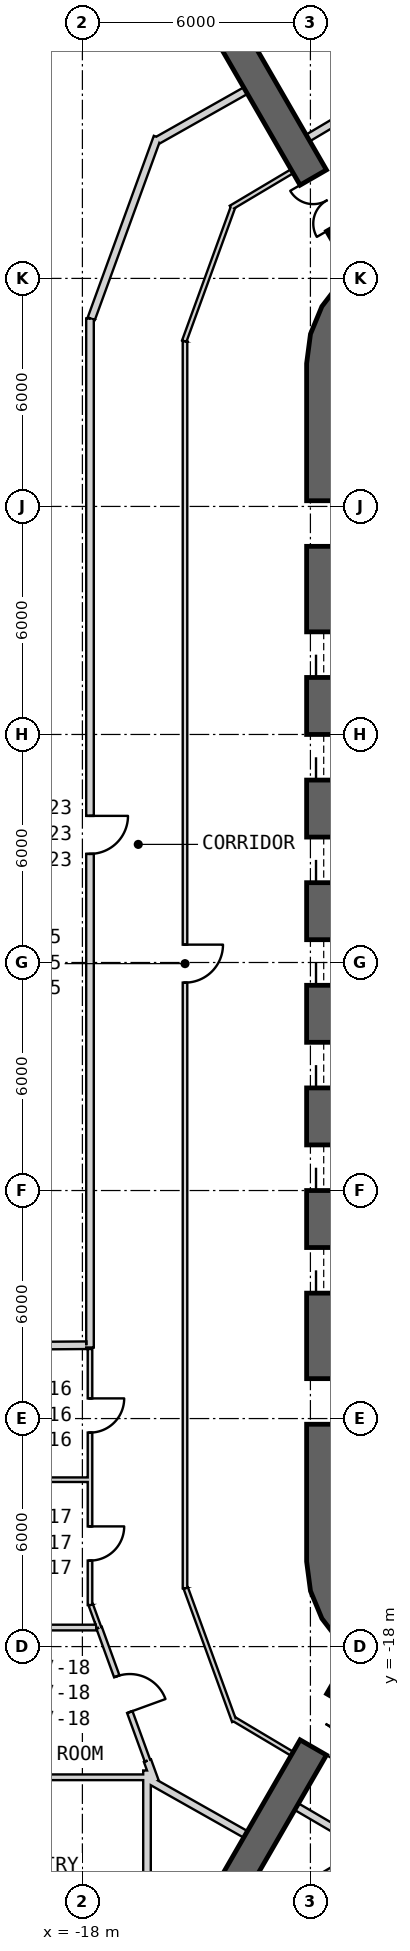
"""IFC4 building model, lengths in metres.
Left out: names, types, materials, properties, quantities, classifications, styles, units other than length and angle.
Written with IfcOpenShell. Run it as: python <this file> out.ifc"""

import sys

from ifc_helpers import new_model, si_unit, direction, frame, frame_2d, origin, place, context, subcontext, project, spatial, polyline, rectangle, outline, extrude, element, fill, save


model = new_model("IFC4")
c1 = context("Model", 3, precision=1e-05, world=origin(), true_north=direction((0.0, 1.0)))
c2 = subcontext(c1, "Body", "Model", "MODEL_VIEW")
j1 = project(units=[si_unit("LENGTHUNIT", "METRE"), si_unit("PLANEANGLEUNIT", "RADIAN")], contexts=[c1])
p1 = place(None, origin())
s1 = spatial("IfcSite", under=j1, at=p1, CompositionType="ELEMENT")
p2 = place(p1, origin())
s2 = spatial("IfcBuilding", under=s1, at=p2, CompositionType="ELEMENT")
p3 = place(p2, frame((0.0, 0.0, 131.6)))
s3 = spatial("IfcBuildingStorey", under=s2, at=p3, CompositionType="ELEMENT", Elevation=131.6)
p4 = place(p3, frame((-11.65, 15.762, 0.0), z_axis=(0.0, 0.0, 1.0), x_axis=(0.0, -1.0, 0.0)))
e1 = element("IfcWall", 1, at=p4, inside=s3, PredefinedType="SHEAR", context=c2, shape_type="SweptSolid", body=[
    extrude(rectangle(XDim=31.523, YDim=0.9, at=frame_2d((15.762, 0.0))), origin(), (0.0, 0.0, 1.0), 4.1),
])
p5 = place(p4, frame((7.062, 0.0, 0.0)))
e2 = element("IfcOpeningElement", 2, at=p5, cuts=e1, PredefinedType="OPENING", context=c2, shape_type="SweptSolid", body=[
    extrude(rectangle(XDim=1.2, YDim=2.4, at=frame_2d((0.6, 1.2))), frame((0.0, 0.46, 0.0), z_axis=(0.0, -1.0, 0.0), x_axis=(1.0, 0.0, 0.0)), (0.0, 0.0, 1.0), 0.92),
])
p6 = place(p4, frame((9.762, 0.0, 0.0)))
e3 = element("IfcOpeningElement", 3, at=p6, cuts=e1, PredefinedType="OPENING", context=c2, shape_type="SweptSolid", body=[
    extrude(rectangle(XDim=1.2, YDim=2.4, at=frame_2d((0.6, 1.2))), frame((0.0, 0.46, 0.0), z_axis=(0.0, -1.0, 0.0), x_axis=(1.0, 0.0, 0.0)), (0.0, 0.0, 1.0), 0.92),
])
p7 = place(p4, frame((12.462, 0.0, 0.0)))
e4 = element("IfcOpeningElement", 4, at=p7, cuts=e1, PredefinedType="OPENING", context=c2, shape_type="SweptSolid", body=[
    extrude(rectangle(XDim=1.2, YDim=2.4, at=frame_2d((0.6, 1.2))), frame((0.0, 0.46, 0.0), z_axis=(0.0, -1.0, 0.0), x_axis=(1.0, 0.0, 0.0)), (0.0, 0.0, 1.0), 0.92),
])
p8 = place(p4, frame((15.162, 0.0, 0.0)))
e5 = element("IfcOpeningElement", 5, at=p8, cuts=e1, PredefinedType="OPENING", context=c2, shape_type="SweptSolid", body=[
    extrude(rectangle(XDim=1.2, YDim=2.4, at=frame_2d((0.6, 1.2))), frame((0.0, 0.46, 0.0), z_axis=(0.0, -1.0, 0.0), x_axis=(1.0, 0.0, 0.0)), (0.0, 0.0, 1.0), 0.92),
])
p9 = place(p4, frame((17.862, 0.0, 0.0)))
e6 = element("IfcOpeningElement", 6, at=p9, cuts=e1, PredefinedType="OPENING", context=c2, shape_type="SweptSolid", body=[
    extrude(rectangle(XDim=1.2, YDim=2.4, at=frame_2d((0.6, 1.2))), frame((0.0, 0.46, 0.0), z_axis=(0.0, -1.0, 0.0), x_axis=(1.0, 0.0, 0.0)), (0.0, 0.0, 1.0), 0.92),
])
p10 = place(p4, frame((20.562, 0.0, 0.0)))
e7 = element("IfcOpeningElement", 7, at=p10, cuts=e1, PredefinedType="OPENING", context=c2, shape_type="SweptSolid", body=[
    extrude(rectangle(XDim=1.2, YDim=2.4, at=frame_2d((0.6, 1.2))), frame((0.0, 0.46, 0.0), z_axis=(0.0, -1.0, 0.0), x_axis=(1.0, 0.0, 0.0)), (0.0, 0.0, 1.0), 0.92),
])
p11 = place(p4, frame((23.262, 0.0, 0.0)))
e8 = element("IfcOpeningElement", 8, at=p11, cuts=e1, PredefinedType="OPENING", context=c2, shape_type="SweptSolid", body=[
    extrude(rectangle(XDim=1.2, YDim=2.4, at=frame_2d((0.6, 1.2))), frame((0.0, 0.46, 0.0), z_axis=(0.0, -1.0, 0.0), x_axis=(1.0, 0.0, 0.0)), (0.0, 0.0, 1.0), 0.92),
])
p12 = place(p4, frame((3.612, 0.0, 0.0)))
e9 = element("IfcOpeningElement", 9, at=p12, cuts=e1, PredefinedType="OPENING", context=c2, shape_type="SweptSolid", body=[
    extrude(rectangle(XDim=1.2, YDim=2.4, at=frame_2d((0.6, 1.2))), frame((0.0, 0.46, 0.0), z_axis=(0.0, -1.0, 0.0), x_axis=(1.0, 0.0, 0.0)), (0.0, 0.0, 1.0), 0.92),
])
p13 = place(p4, frame((26.712, 0.0, 0.0)))
e10 = element("IfcOpeningElement", 10, at=p13, cuts=e1, PredefinedType="OPENING", context=c2, shape_type="SweptSolid", body=[
    extrude(rectangle(XDim=1.2, YDim=2.4, at=frame_2d((0.6, 1.2))), frame((0.0, 0.46, 0.0), z_axis=(0.0, -1.0, 0.0), x_axis=(1.0, 0.0, 0.0)), (0.0, 0.0, 1.0), 0.92),
])
p14 = place(p3, origin())
e11 = element("IfcWall", 11, at=p14, inside=s3, PredefinedType="SHEAR", context=c2, shape_type="SweptSolid", body=[
    extrude(outline(polyline([(-7.6, 18.36), (-8.323, 18.659), (-9.1, 18.762), (-9.876, 18.659), (-10.6, 18.36), (-11.221, 17.883), (-11.698, 17.262), (-11.998, 16.538), (-12.1, 15.762), (-11.2, 15.762), (-11.128, 16.305), (-10.919, 16.812), (-10.585, 17.247), (-10.15, 17.58), (-9.644, 17.79), (-9.1, 17.862), (-8.556, 17.79), (-8.05, 17.58), (-7.6, 18.36)])), origin(), (0.0, 0.0, 1.0), 4.1),
])
p15 = place(p3, origin())
e12 = element("IfcWall", 12, at=p15, inside=s3, PredefinedType="SHEAR", context=c2, shape_type="SweptSolid", body=[
    extrude(outline(polyline([(-12.1, -15.762), (-11.998, -16.538), (-11.698, -17.262), (-11.221, -17.883), (-10.6, -18.36), (-9.876, -18.659), (-9.1, -18.762), (-8.323, -18.659), (-7.6, -18.36), (-8.05, -17.58), (-8.556, -17.79), (-9.1, -17.862), (-9.644, -17.79), (-10.15, -17.58), (-10.585, -17.247), (-10.919, -16.812), (-11.128, -16.305), (-11.2, -15.762), (-12.1, -15.762)])), origin(), (0.0, 0.0, 1.0), 4.1),
])
p16 = place(p3, frame((-10.575, 18.316, 0.0), z_axis=(0.0, 0.0, 1.0), x_axis=(-0.500005394759, 0.866022289097, 0.0)))
e13 = element("IfcWall", 13, at=p16, inside=s3, PredefinedType="SHEAR", context=c2, shape_type="SweptSolid", body=[
    extrude(rectangle(XDim=12.598, YDim=0.8, at=frame_2d((6.299, 0.0))), origin(), (0.0, 0.0, 1.0), 4.1),
])
p17 = place(p16, frame((1.3, 0.0, 0.0)))
e14 = element("IfcOpeningElement", 14, at=p17, cuts=e13, PredefinedType="OPENING", context=c2, shape_type="SweptSolid", body=[
    extrude(rectangle(XDim=1.4, YDim=2.4, at=frame_2d((0.7, 1.2))), frame((0.0, 0.41, 0.0), z_axis=(0.0, -1.0, 0.0), x_axis=(1.0, 0.0, 0.0)), (0.0, 0.0, 1.0), 0.82),
])
p18 = place(p3, frame((-10.575, -18.316, 0.0), z_axis=(0.0, 0.0, 1.0), x_axis=(-0.500005394759, -0.866022289097, 0.0)))
e15 = element("IfcWall", 15, at=p18, inside=s3, PredefinedType="SHEAR", context=c2, shape_type="SweptSolid", body=[
    extrude(rectangle(XDim=12.598, YDim=0.8, at=frame_2d((6.299, 0.0))), origin(), (0.0, 0.0, 1.0), 4.1),
])
p19 = place(p18, frame((1.3, 0.0, 0.0)))
e16 = element("IfcOpeningElement", 16, at=p19, cuts=e15, PredefinedType="OPENING", context=c2, shape_type="SweptSolid", body=[
    extrude(rectangle(XDim=1.4, YDim=2.4, at=frame_2d((0.7, 1.2))), frame((0.0, 0.41, 0.0), z_axis=(0.0, -1.0, 0.0), x_axis=(1.0, 0.0, 0.0)), (0.0, 0.0, 1.0), 0.82),
])
p20 = place(p3, frame((-12.482, 20.819, 0.0), z_axis=(0.0, 0.0, 1.0), x_axis=(-0.85913200524, -0.511754040113, 0.0)))
e17 = element("IfcWall", 17, at=p20, inside=s3, PredefinedType="PARTITIONING", context=c2, shape_type="SweptSolid", body=[
    extrude(rectangle(XDim=1.875, YDim=0.12, at=frame_2d((0.937, 0.0))), origin(), (0.0, 0.0, 1.0), 3.8),
])
p21 = place(p3, frame((-14.038, 19.872, 0.0), z_axis=(0.0, 0.0, 1.0), x_axis=(-0.342035870777, -0.939686896313, 0.0)))
e18 = element("IfcWall", 18, at=p21, inside=s3, PredefinedType="PARTITIONING", context=c2, shape_type="SweptSolid", body=[
    extrude(rectangle(XDim=3.749, YDim=0.12, at=frame_2d((1.875, 0.0))), origin(), (0.0, 0.0, 1.0), 2.88),
])
p22 = place(p3, frame((-15.3, 16.345, 0.0), z_axis=(0.0, 0.0, 1.0), x_axis=(0.0, -1.0, 0.0)))
e19 = element("IfcWall", 19, at=p22, inside=s3, PredefinedType="PARTITIONING", context=c2, shape_type="SweptSolid", body=[
    extrude(rectangle(XDim=32.811, YDim=0.12, at=frame_2d((16.405, 0.0))), origin(), (0.0, 0.0, 1.0), 2.98),
])
p23 = place(p22, frame((15.875, 0.0, 0.0)))
e20 = element("IfcOpeningElement", 20, at=p23, cuts=e19, PredefinedType="OPENING", context=c2, shape_type="SweptSolid", body=[
    extrude(rectangle(XDim=1.0, YDim=2.1, at=frame_2d((0.5, 1.05))), frame((0.0, 0.07, 0.0), z_axis=(0.0, -1.0, 0.0), x_axis=(1.0, 0.0, 0.0)), (0.0, 0.0, 1.0), 0.14),
])
p24 = place(p3, frame((-15.28, -16.462, 0.0), z_axis=(0.0, 0.0, 1.0), x_axis=(0.34206888523, -0.939674878752, 0.0)))
e21 = element("IfcWall", 21, at=p24, inside=s3, PredefinedType="PARTITIONING", context=c2, shape_type="SweptSolid", body=[
    extrude(rectangle(XDim=3.73, YDim=0.12, at=frame_2d((1.865, 0.0))), origin(), (0.0, 0.0, 1.0), 2.88),
])
p25 = place(p3, frame((-14.005, -19.912, 0.0), z_axis=(0.0, 0.0, 1.0), x_axis=(0.859128591272, -0.511759771435, 0.0)))
e22 = element("IfcWall", 22, at=p25, inside=s3, PredefinedType="PARTITIONING", context=c2, shape_type="SweptSolid", body=[
    extrude(rectangle(XDim=1.773, YDim=0.12, at=frame_2d((0.887, 0.0))), origin(), (0.0, 0.0, 1.0), 3.8),
])
p26 = place(p3, frame((-17.8, 16.946, 0.0), z_axis=(0.0, 0.0, 1.0), x_axis=(0.0, -1.0, 0.0)))
e23 = element("IfcWall", 23, at=p26, inside=s3, PredefinedType="PARTITIONING", context=c2, shape_type="SweptSolid", body=[
    extrude(rectangle(XDim=27.076, YDim=0.2, at=frame_2d((13.538, 0.0))), origin(), (0.0, 0.0, 1.0), 3.08),
])
p27 = place(p26, frame((13.088, 0.0, 0.0)))
e24 = element("IfcOpeningElement", 24, at=p27, cuts=e23, PredefinedType="OPENING", context=c2, shape_type="SweptSolid", body=[
    extrude(rectangle(XDim=1.0, YDim=2.1, at=frame_2d((0.5, 1.05))), frame((0.0, 0.11, 0.0), z_axis=(0.0, -1.0, 0.0), x_axis=(1.0, 0.0, 0.0)), (0.0, 0.0, 1.0), 0.22),
])
p28 = place(p3, frame((-16.027, 21.718, 0.0), z_axis=(0.0, 0.0, 1.0), x_axis=(-0.342039923135, -0.939685421288, 0.0)))
e25 = element("IfcWall", 25, at=p28, inside=s3, PredefinedType="PARTITIONING", context=c2, shape_type="SweptSolid", body=[
    extrude(rectangle(XDim=5.084, YDim=0.2, at=frame_2d((2.542, 0.0))), origin(), (0.0, 0.0, 1.0), 2.88),
])
p29 = place(p3, frame((-13.707, 22.94, 0.0), z_axis=(0.0, 0.0, 1.0), x_axis=(-0.870827475384, -0.491588759143, 0.0)))
e26 = element("IfcWall", 26, at=p29, inside=s3, PredefinedType="PARTITIONING", context=c2, shape_type="SweptSolid", body=[
    extrude(rectangle(XDim=2.662, YDim=0.2, at=frame_2d((1.331, 0.0))), origin(), (0.0, 0.0, 1.0), 3.8),
])
p30 = place(p3, frame((-16.2, -21.532, 0.0), z_axis=(0.0, 0.0, 1.0), x_axis=(0.870802525435, -0.491632954241, 0.0)))
e27 = element("IfcWall", 27, at=p30, inside=s3, PredefinedType="PARTITIONING", context=c2, shape_type="SweptSolid", body=[
    extrude(rectangle(XDim=2.863, YDim=0.2, at=frame_2d((1.432, 0.0))), origin(), (0.0, 0.0, 1.0), 3.8),
])
p31 = place(p3, frame((-16.288, -21.001, 0.0), z_axis=(0.0, 0.0, 1.0), x_axis=(0.342137351889, -0.939649952079, 0.0)))
e28 = element("IfcWall", 28, at=p31, inside=s3, PredefinedType="PARTITIONING", context=c2, shape_type="SweptSolid", body=[
    extrude(rectangle(XDim=0.596, YDim=0.2, at=frame_2d((0.298, 0.0))), origin(), (0.0, 0.0, 1.0), 2.88),
])
p32 = place(p3, frame((-17.8, -10.17, 0.0), z_axis=(0.0, 0.0, 1.0), x_axis=(0.0, -1.0, 0.0)))
e29 = element("IfcWall", 29, at=p32, inside=s3, PredefinedType="PARTITIONING", context=c2, shape_type="SweptSolid", body=[
    extrude(rectangle(XDim=6.736, YDim=0.12, at=frame_2d((3.368, 0.0))), origin(), (0.0, 0.0, 1.0), 3.08),
])
p33 = place(p32, frame((1.3, 0.0, 0.0)))
e30 = element("IfcOpeningElement", 30, at=p33, cuts=e29, PredefinedType="OPENING", context=c2, shape_type="SweptSolid", body=[
    extrude(rectangle(XDim=0.9, YDim=2.1, at=frame_2d((0.45, 1.05))), frame((0.0, 0.07, 0.0), z_axis=(0.0, -1.0, 0.0), x_axis=(1.0, 0.0, 0.0)), (0.0, 0.0, 1.0), 0.14),
])
p34 = place(p32, frame((4.667, 0.0, 0.0)))
e31 = element("IfcOpeningElement", 31, at=p34, cuts=e29, PredefinedType="OPENING", context=c2, shape_type="SweptSolid", body=[
    extrude(rectangle(XDim=0.9, YDim=2.1, at=frame_2d((0.45, 1.05))), frame((0.0, 0.07, 0.0), z_axis=(0.0, -1.0, 0.0), x_axis=(1.0, 0.0, 0.0)), (0.0, 0.0, 1.0), 0.14),
])
p35 = place(p3, frame((-17.78, -16.902, 0.0), z_axis=(0.0, 0.0, 1.0), x_axis=(0.341988220281, -0.93970423921, 0.0)))
e32 = element("IfcWall", 32, at=p35, inside=s3, PredefinedType="PARTITIONING", context=c2, shape_type="SweptSolid", body=[
    extrude(rectangle(XDim=0.64, YDim=0.12, at=frame_2d((0.32, 0.0))), origin(), (0.0, 0.0, 1.0), 2.98),
])
p36 = place(p3, frame((-17.561, -17.503, 0.0), z_axis=(0.0, 0.0, 1.0), x_axis=(0.342022140343, -0.939691893929, 0.0)))
e33 = element("IfcWall", 33, at=p36, inside=s3, PredefinedType="PLUMBINGWALL", context=c2, shape_type="SweptSolid", body=[
    extrude(rectangle(XDim=3.723, YDim=0.15, at=frame_2d((1.861, 0.0))), origin(), (0.0, 0.0, 1.0), 2.88),
])
p37 = place(p36, frame((1.361, 0.0, 0.0)))
e34 = element("IfcOpeningElement", 34, at=p37, cuts=e33, PredefinedType="OPENING", context=c2, shape_type="SweptSolid", body=[
    extrude(rectangle(XDim=1.0, YDim=2.1, at=frame_2d((0.5, 1.05))), frame((0.0, 0.085, 0.0), z_axis=(0.0, -1.0, 0.0), x_axis=(1.0, 0.0, 0.0)), (0.0, 0.0, 1.0), 0.17),
])
p38 = place(p3, frame((-10.228, 22.786, 0.0), z_axis=(0.0, 0.0, 1.0), x_axis=(-0.859754348804, -0.510707802674, 0.0)))
e35 = element("IfcWall", 35, at=p38, inside=s3, PredefinedType="PARTITIONING", context=c2, shape_type="SweptSolid", body=[
    extrude(rectangle(XDim=2.135, YDim=0.2, at=frame_2d((1.068, 0.0))), origin(), (0.0, 0.0, 1.0), 3.8),
])
p39 = place(p3, frame((-12.363, -22.213, 0.0), z_axis=(0.0, 0.0, 1.0), x_axis=(0.863185097125, -0.504887599472, 0.0)))
e36 = element("IfcWall", 36, at=p39, inside=s3, PredefinedType="PARTITIONING", context=c2, shape_type="SweptSolid", body=[
    extrude(rectangle(XDim=2.403, YDim=0.2, at=frame_2d((1.202, 0.0))), origin(), (0.0, 0.0, 1.0), 3.8),
])
p40 = place(p3, frame((-21.83, -10.101, 0.0), z_axis=(0.0, 0.0, 1.0), x_axis=(0.999970811124, 0.007640477685, 0.0)))
e37 = element("IfcWall", 37, at=p40, inside=s3, PredefinedType="PARTITIONING", context=c2, shape_type="SweptSolid", body=[
    extrude(rectangle(XDim=3.93, YDim=0.2, at=frame_2d((1.965, 0.0))), origin(), (0.0, 0.0, 1.0), 3.8),
])
p41 = place(p3, frame((-16.3, -26.04, 0.0), z_axis=(0.0, 0.0, 1.0), x_axis=(0.0, 1.0, 0.0)))
e38 = element("IfcWall", 38, at=p41, inside=s3, PredefinedType="PARTITIONING", context=c2, shape_type="SweptSolid", body=[
    extrude(rectangle(XDim=4.78, YDim=0.2, at=frame_2d((2.39, 0.0))), origin(), (0.0, 0.0, 1.0), 2.88),
])
p42 = place(p3, frame((-10.553, -23.38, 0.0), z_axis=(0.0, 0.0, 1.0), x_axis=(-0.856707917583, -0.515801845625, 0.0)))
e39 = element("IfcWall", 39, at=p42, inside=s3, PredefinedType="PARTITIONING", context=c2, shape_type="SweptSolid", body=[
    extrude(rectangle(XDim=1.649, YDim=0.2, at=frame_2d((0.824, 0.0))), origin(), (0.0, 0.0, 1.0), 3.8),
])
p43 = place(p3, frame((-17.86, -13.609, 0.0), z_axis=(0.0, 0.0, 1.0), x_axis=(-1.0, 0.0, 0.0)))
e40 = element("IfcWall", 40, at=p43, inside=s3, PredefinedType="PARTITIONING", context=c2, shape_type="SweptSolid", body=[
    extrude(rectangle(XDim=3.77, YDim=0.12, at=frame_2d((1.885, 0.0))), origin(), (0.0, 0.0, 1.0), 3.08),
])
p44 = place(p3, frame((-17.626, -17.499, 0.0), z_axis=(0.0, 0.0, 1.0), x_axis=(-1.0, 0.0, 0.0)))
e41 = element("IfcWall", 41, at=p44, inside=s3, PredefinedType="PLUMBINGWALL", context=c2, shape_type="SweptSolid", body=[
    extrude(rectangle(XDim=4.004, YDim=0.15, at=frame_2d((2.002, 0.0))), origin(), (0.0, 0.0, 1.0), 2.98),
])
p45 = place(p3, frame((-16.375, -21.439, 0.0), z_axis=(0.0, 0.0, 1.0), x_axis=(-1.0, 0.0, 0.0)))
e42 = element("IfcWall", 42, at=p45, inside=s3, PredefinedType="PLUMBINGWALL", context=c2, shape_type="SweptSolid", body=[
    extrude(rectangle(XDim=5.28, YDim=0.15, at=frame_2d((2.64, 0.0))), origin(), (0.0, 0.0, 1.0), 2.88),
])
p46 = place(p23, origin())
e43 = element("IfcDoor", 43, at=p46, inside=s3, OperationType="SINGLE_SWING_LEFT", PredefinedType="NOTDEFINED", context=c2, shape_type="SweptSolid", body=[
    extrude(rectangle(XDim=1.0, YDim=2.1, at=frame_2d((0.5, 1.05))), frame((0.0, 0.025, 0.0), z_axis=(0.0, -1.0, 0.0), x_axis=(1.0, 0.0, 0.0)), (0.0, 0.0, 1.0), 0.05),
])
fill(e20, e43)
p47 = place(p33, origin())
e44 = element("IfcDoor", 44, at=p47, inside=s3, OperationType="SINGLE_SWING_LEFT", PredefinedType="NOTDEFINED", context=c2, shape_type="SweptSolid", body=[
    extrude(rectangle(XDim=0.9, YDim=2.1, at=frame_2d((0.45, 1.05))), frame((0.0, 0.025, 0.0), z_axis=(0.0, -1.0, 0.0), x_axis=(1.0, 0.0, 0.0)), (0.0, 0.0, 1.0), 0.05),
])
fill(e30, e44)
p48 = place(p34, origin())
e45 = element("IfcDoor", 45, at=p48, inside=s3, OperationType="SINGLE_SWING_RIGHT", PredefinedType="NOTDEFINED", context=c2, shape_type="SweptSolid", body=[
    extrude(rectangle(XDim=0.9, YDim=2.1, at=frame_2d((0.45, 1.05))), frame((0.0, 0.025, 0.0), z_axis=(0.0, -1.0, 0.0), x_axis=(1.0, 0.0, 0.0)), (0.0, 0.0, 1.0), 0.05),
])
fill(e31, e45)
p49 = place(p37, origin())
e46 = element("IfcDoor", 46, at=p49, inside=s3, OperationType="SINGLE_SWING_LEFT", PredefinedType="USERDEFINED", context=c2, shape_type="SweptSolid", body=[
    extrude(rectangle(XDim=1.0, YDim=2.1, at=frame_2d((0.5, 1.05))), frame((0.0, 0.025, 0.0), z_axis=(0.0, -1.0, 0.0), x_axis=(1.0, 0.0, 0.0)), (0.0, 0.0, 1.0), 0.05),
])
fill(e34, e46)
p50 = place(p27, origin())
e47 = element("IfcDoor", 47, at=p50, inside=s3, OperationType="SINGLE_SWING_LEFT", PredefinedType="USERDEFINED", context=c2, shape_type="SweptSolid", body=[
    extrude(rectangle(XDim=1.0, YDim=2.1, at=frame_2d((0.5, 1.05))), frame((0.0, 0.025, 0.0), z_axis=(0.0, -1.0, 0.0), x_axis=(1.0, 0.0, 0.0)), (0.0, 0.0, 1.0), 0.05),
])
fill(e24, e47)
p51 = place(p5, origin())
e48 = element("IfcDoor", 48, at=p51, inside=s3, OperationType="SLIDING_TO_LEFT", PredefinedType="USERDEFINED", context=c2, shape_type="SweptSolid", body=[
    extrude(rectangle(XDim=1.2, YDim=2.4, at=frame_2d((0.6, 1.2))), frame((0.0, 0.025, 0.0), z_axis=(0.0, -1.0, 0.0), x_axis=(1.0, 0.0, 0.0)), (0.0, 0.0, 1.0), 0.05),
])
fill(e2, e48)
p52 = place(p6, origin())
e49 = element("IfcDoor", 49, at=p52, inside=s3, OperationType="SLIDING_TO_LEFT", PredefinedType="USERDEFINED", context=c2, shape_type="SweptSolid", body=[
    extrude(rectangle(XDim=1.2, YDim=2.4, at=frame_2d((0.6, 1.2))), frame((0.0, 0.025, 0.0), z_axis=(0.0, -1.0, 0.0), x_axis=(1.0, 0.0, 0.0)), (0.0, 0.0, 1.0), 0.05),
])
fill(e3, e49)
p53 = place(p7, origin())
e50 = element("IfcDoor", 50, at=p53, inside=s3, OperationType="SLIDING_TO_LEFT", PredefinedType="USERDEFINED", context=c2, shape_type="SweptSolid", body=[
    extrude(rectangle(XDim=1.2, YDim=2.4, at=frame_2d((0.6, 1.2))), frame((0.0, 0.025, 0.0), z_axis=(0.0, -1.0, 0.0), x_axis=(1.0, 0.0, 0.0)), (0.0, 0.0, 1.0), 0.05),
])
fill(e4, e50)
p54 = place(p8, origin())
e51 = element("IfcDoor", 51, at=p54, inside=s3, OperationType="SLIDING_TO_LEFT", PredefinedType="USERDEFINED", context=c2, shape_type="SweptSolid", body=[
    extrude(rectangle(XDim=1.2, YDim=2.4, at=frame_2d((0.6, 1.2))), frame((0.0, 0.025, 0.0), z_axis=(0.0, -1.0, 0.0), x_axis=(1.0, 0.0, 0.0)), (0.0, 0.0, 1.0), 0.05),
])
fill(e5, e51)
p55 = place(p9, origin())
e52 = element("IfcDoor", 52, at=p55, inside=s3, OperationType="SLIDING_TO_LEFT", PredefinedType="USERDEFINED", context=c2, shape_type="SweptSolid", body=[
    extrude(rectangle(XDim=1.2, YDim=2.4, at=frame_2d((0.6, 1.2))), frame((0.0, 0.025, 0.0), z_axis=(0.0, -1.0, 0.0), x_axis=(1.0, 0.0, 0.0)), (0.0, 0.0, 1.0), 0.05),
])
fill(e6, e52)
p56 = place(p10, origin())
e53 = element("IfcDoor", 53, at=p56, inside=s3, OperationType="SLIDING_TO_LEFT", PredefinedType="USERDEFINED", context=c2, shape_type="SweptSolid", body=[
    extrude(rectangle(XDim=1.2, YDim=2.4, at=frame_2d((0.6, 1.2))), frame((0.0, 0.025, 0.0), z_axis=(0.0, -1.0, 0.0), x_axis=(1.0, 0.0, 0.0)), (0.0, 0.0, 1.0), 0.05),
])
fill(e7, e53)
p57 = place(p11, origin())
e54 = element("IfcDoor", 54, at=p57, inside=s3, OperationType="SLIDING_TO_LEFT", PredefinedType="USERDEFINED", context=c2, shape_type="SweptSolid", body=[
    extrude(rectangle(XDim=1.2, YDim=2.4, at=frame_2d((0.6, 1.2))), frame((0.0, 0.025, 0.0), z_axis=(0.0, -1.0, 0.0), x_axis=(1.0, 0.0, 0.0)), (0.0, 0.0, 1.0), 0.05),
])
fill(e8, e54)
p58 = place(p12, origin())
e55 = element("IfcDoor", 55, at=p58, inside=s3, OperationType="SINGLE_SWING_LEFT", PredefinedType="USERDEFINED", context=c2, shape_type="SweptSolid", body=[
    extrude(rectangle(XDim=1.2, YDim=2.4, at=frame_2d((0.6, 1.2))), frame((0.0, 0.025, 0.0), z_axis=(0.0, -1.0, 0.0), x_axis=(1.0, 0.0, 0.0)), (0.0, 0.0, 1.0), 0.05),
])
fill(e9, e55)
p59 = place(p13, origin())
e56 = element("IfcDoor", 56, at=p59, inside=s3, OperationType="SINGLE_SWING_LEFT", PredefinedType="USERDEFINED", context=c2, shape_type="SweptSolid", body=[
    extrude(rectangle(XDim=1.2, YDim=2.4, at=frame_2d((0.6, 1.2))), frame((0.0, 0.025, 0.0), z_axis=(0.0, -1.0, 0.0), x_axis=(1.0, 0.0, 0.0)), (0.0, 0.0, 1.0), 0.05),
])
fill(e10, e56)
p60 = place(p17, origin())
e57 = element("IfcDoor", 57, at=p60, inside=s3, OperationType="DOUBLE_DOOR_SINGLE_SWING", PredefinedType="NOTDEFINED", context=c2, shape_type="SweptSolid", body=[
    extrude(rectangle(XDim=1.4, YDim=2.4, at=frame_2d((0.7, 1.2))), frame((0.0, 0.025, 0.0), z_axis=(0.0, -1.0, 0.0), x_axis=(1.0, 0.0, 0.0)), (0.0, 0.0, 1.0), 0.05),
])
fill(e14, e57)
p61 = place(p19, origin())
e58 = element("IfcDoor", 58, at=p61, inside=s3, OperationType="DOUBLE_DOOR_SINGLE_SWING", PredefinedType="NOTDEFINED", context=c2, shape_type="SweptSolid", body=[
    extrude(rectangle(XDim=1.4, YDim=2.4, at=frame_2d((0.7, 1.2))), frame((0.0, 0.025, 0.0), z_axis=(0.0, -1.0, 0.0), x_axis=(1.0, 0.0, 0.0)), (0.0, 0.0, 1.0), 0.05),
])
fill(e16, e58)
save(model, sys.argv[1])
